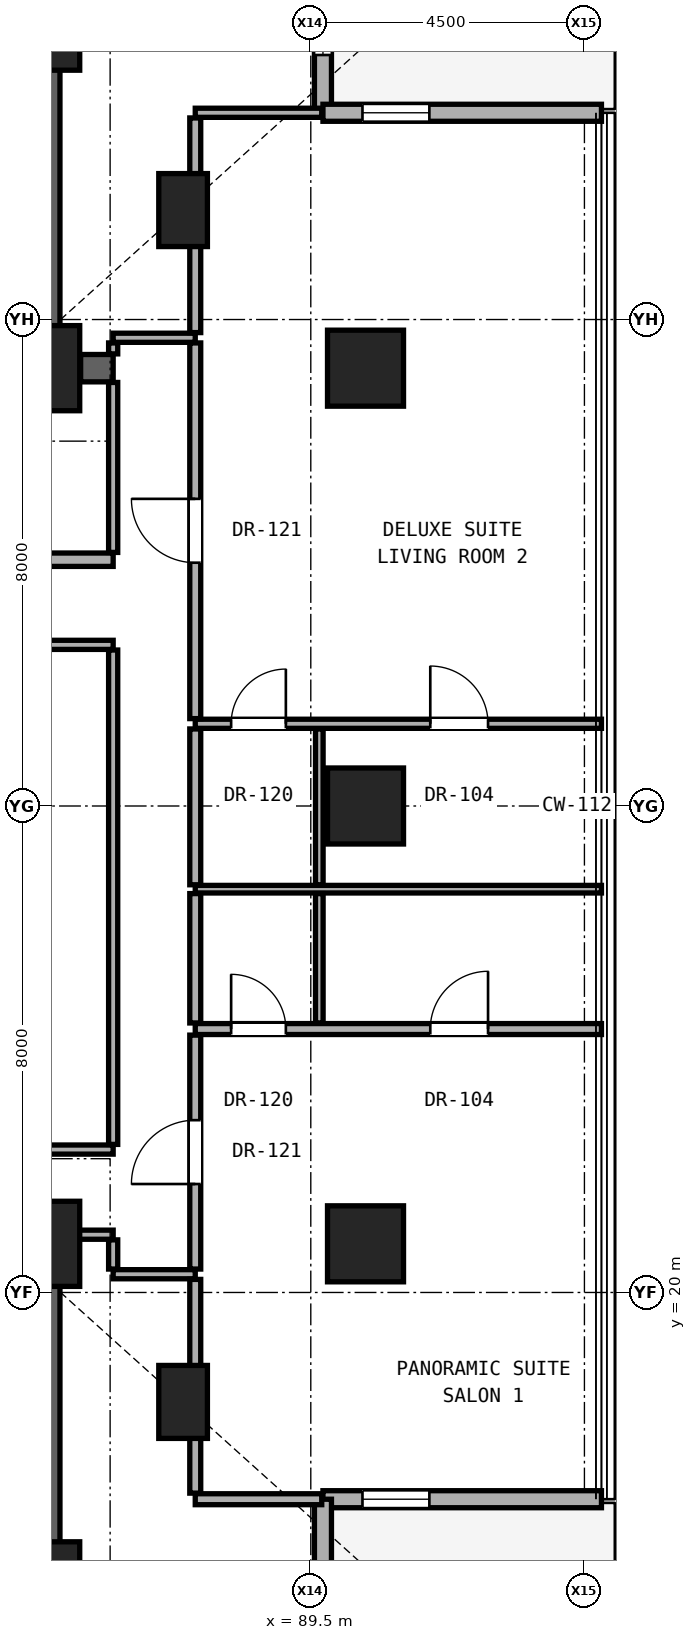
"""IFC4 building model, lengths in metres.
Left out: names, types, materials, properties, quantities, classifications, styles, units other than length and angle.
Written with IfcOpenShell. Run it as: python <this file> out.ifc"""

import sys

from ifc_helpers import new_model, si_unit, direction, frame, frame_2d, origin, origin_2d, place, context, subcontext, project, spatial, rectangle, hollow_rectangle, extrude, element, fill, save


model = new_model("IFC4")
c1 = context("Model", 3, precision=1e-05, world=origin(), true_north=direction((0.0, 1.0)))
c2 = subcontext(c1, "Body", "Model", "MODEL_VIEW")
j1 = project(units=[si_unit("LENGTHUNIT", "METRE"), si_unit("PLANEANGLEUNIT", "RADIAN")], contexts=[c1])
p1 = place(None, origin())
s1 = spatial("IfcSite", under=j1, at=p1, CompositionType="ELEMENT")
p2 = place(p1, origin())
s2 = spatial("IfcBuilding", under=s1, at=p2, CompositionType="ELEMENT")
p3 = place(p2, frame((0.0, 0.0, 22.4)))
s3 = spatial("IfcBuildingStorey", under=s2, at=p3, CompositionType="ELEMENT", Elevation=22.4)
for number, where, z_axis, x_axis in (
    (1, (85.0, 15.2, 0.0), (0.0, 0.0, 1.0), (1.0, 0.0, 0.0)),
    (2, (85.0, 20.8, 0.0), (0.0, 0.0, 1.0), (1.0, 0.0, 0.0)),
    (3, (85.0, 35.2, 0.0), (0.0, 0.0, 1.0), (1.0, 0.0, 0.0)),
    (4, (85.0, 40.8, 0.0), (0.0, 0.0, 1.0), (1.0, 0.0, 0.0)),
):
    element("IfcColumn", number, at=place(p3, frame(where, z_axis=z_axis, x_axis=x_axis)), inside=s3, PredefinedType="COLUMN", context=c2, shape_type="SweptSolid", body=[
        extrude(rectangle(XDim=1.4, YDim=1.4, at=origin_2d()), origin(), (0.0, 0.0, 1.0), 3.3),
    ])
for number, where, z_axis, x_axis in (
    (5, (90.4, 20.8, 0.0), (0.0, 0.0, 1.0), (1.0, 0.0, 0.0)),
    (6, (90.4, 28.0, 0.0), (0.0, 0.0, 1.0), (1.0, 0.0, 0.0)),
    (7, (90.4, 35.2, 0.0), (0.0, 0.0, 1.0), (1.0, 0.0, 0.0)),
):
    element("IfcColumn", number, at=place(p3, frame(where, z_axis=z_axis, x_axis=x_axis)), inside=s3, PredefinedType="COLUMN", context=c2, shape_type="SweptSolid", body=[
        extrude(hollow_rectangle(XDim=1.25, YDim=1.25, WallThickness=0.07, at=origin_2d()), origin(), (0.0, 0.0, 1.0), 3.3),
    ])
for number, where, z_axis, x_axis in (
    (8, (87.4, 18.2, 0.0), (0.0, 0.0, 1.0), (1.0, 0.0, 0.0)),
    (9, (87.4, 37.8, 0.0), (0.0, 0.0, 1.0), (1.0, 0.0, 0.0)),
):
    element("IfcColumn", number, at=place(p3, frame(where, z_axis=z_axis, x_axis=x_axis)), inside=s3, PredefinedType="PILASTER", context=c2, shape_type="SweptSolid", body=[
        extrude(rectangle(XDim=0.8, YDim=1.2, at=origin_2d()), origin(), (0.0, 0.0, 1.0), 3.3),
    ])
for number, where, z_axis, x_axis in (
    (10, (85.0, 35.2, 0.0), (0.0, 0.0, 1.0), (0.0, 1.0, 0.0)),
    (11, (85.0, 15.2, 0.0), (0.0, 0.0, 1.0), (0.0, 1.0, 0.0)),
):
    element("IfcWall", number, at=place(p3, frame(where, z_axis=z_axis, x_axis=x_axis)), inside=s3, PredefinedType="SHEAR", context=c2, shape_type="SweptSolid", body=[
        extrude(rectangle(XDim=5.6, YDim=0.75, at=frame_2d((2.8, 0.0))), origin(), (0.0, 0.0, 1.0), 3.06),
    ])
p4 = place(p3, frame((89.7, 39.4, 0.0), z_axis=(0.0, 0.0, 1.0), x_axis=(0.0, 1.0, 0.0)))
e12 = element("IfcWall", 12, at=p4, inside=s3, PredefinedType="SOLIDWALL", context=c2, shape_type="SweptSolid", body=[
    extrude(rectangle(XDim=4.58, YDim=0.28, at=frame_2d((2.29, 0.0))), origin(), (0.0, 0.0, 1.0), 3.04),
])
p5 = place(p4, frame((0.95, 0.0, 0.85)))
e13 = element("IfcOpeningElement", 13, at=p5, cuts=e12, PredefinedType="OPENING", context=c2, shape_type="SweptSolid", body=[
    extrude(rectangle(XDim=1.1, YDim=2.0, at=frame_2d((0.55, 1.0))), frame((0.0, 0.15, 0.0), z_axis=(0.0, -1.0, 0.0), x_axis=(1.0, 0.0, 0.0)), (0.0, 0.0, 1.0), 0.3),
])
p6 = place(p3, frame((89.7, 16.6, 0.0), z_axis=(0.0, 0.0, 1.0), x_axis=(1.0, 0.0, 0.0)))
e14 = element("IfcWall", 14, at=p6, inside=s3, PredefinedType="SOLIDWALL", context=c2, shape_type="SweptSolid", body=[
    extrude(rectangle(XDim=4.58, YDim=0.28, at=frame_2d((2.29, 0.0))), origin(), (0.0, 0.0, 1.0), 3.04),
])
p7 = place(p6, frame((0.65, 0.0, 0.85)))
e15 = element("IfcOpeningElement", 15, at=p7, cuts=e14, PredefinedType="OPENING", context=c2, shape_type="SweptSolid", body=[
    extrude(rectangle(XDim=1.1, YDim=2.0, at=frame_2d((0.55, 1.0))), frame((0.0, 0.15, 0.0), z_axis=(0.0, -1.0, 0.0), x_axis=(1.0, 0.0, 0.0)), (0.0, 0.0, 1.0), 0.3),
])
p8 = place(p3, frame((89.7, 12.02, 0.0), z_axis=(0.0, 0.0, 1.0), x_axis=(0.0, 1.0, 0.0)))
e16 = element("IfcWall", 16, at=p8, inside=s3, PredefinedType="SOLIDWALL", context=c2, shape_type="SweptSolid", body=[
    extrude(rectangle(XDim=4.58, YDim=0.28, at=frame_2d((2.29, 0.0))), origin(), (0.0, 0.0, 1.0), 3.04),
])
p9 = place(p3, frame((94.28, 39.4, 0.0), z_axis=(0.0, 0.0, 1.0), x_axis=(-1.0, 0.0, 0.0)))
e17 = element("IfcWall", 17, at=p9, inside=s3, PredefinedType="SOLIDWALL", context=c2, shape_type="SweptSolid", body=[
    extrude(rectangle(XDim=4.58, YDim=0.28, at=frame_2d((2.29, 0.0))), origin(), (0.0, 0.0, 1.0), 3.04),
])
p10 = place(p9, frame((2.83, 0.0, 0.85)))
e18 = element("IfcOpeningElement", 18, at=p10, cuts=e17, PredefinedType="OPENING", context=c2, shape_type="SweptSolid", body=[
    extrude(rectangle(XDim=1.1, YDim=2.0, at=frame_2d((0.55, 1.0))), frame((0.0, 0.15, 0.0), z_axis=(0.0, -1.0, 0.0), x_axis=(1.0, 0.0, 0.0)), (0.0, 0.0, 1.0), 0.3),
])
p11 = place(p3, frame((87.6, 16.6, 0.0), z_axis=(0.0, 0.0, 1.0), x_axis=(1.0, 0.0, 0.0)))
e19 = element("IfcWall", 19, at=p11, inside=s3, PredefinedType="PARTITIONING", context=c2, shape_type="SweptSolid", body=[
    extrude(rectangle(XDim=2.08, YDim=0.18, at=frame_2d((1.04, 0.0))), origin(), (0.0, 0.0, 1.0), 3.06),
])
p12 = place(p3, frame((86.25, 20.3, 0.0), z_axis=(0.0, 0.0, 1.0), x_axis=(1.0, 0.0, 0.0)))
e20 = element("IfcWall", 20, at=p12, inside=s3, PredefinedType="PARTITIONING", context=c2, shape_type="SweptSolid", body=[
    extrude(rectangle(XDim=1.35, YDim=0.15, at=frame_2d((0.675, 0.0))), origin(), (0.0, 0.0, 1.0), 3.06),
])
p13 = place(p3, frame((85.37, 20.95, 0.0), z_axis=(0.0, 0.0, 1.0), x_axis=(1.0, 0.0, 0.0)))
e21 = element("IfcWall", 21, at=p13, inside=s3, PredefinedType="PARTITIONING", context=c2, shape_type="SweptSolid", body=[
    extrude(rectangle(XDim=0.88, YDim=0.15, at=frame_2d((0.44, 0.0))), origin(), (0.0, 0.0, 1.0), 2.452),
])
p14 = place(p3, frame((66.62, 22.35, 0.0), z_axis=(0.0, 0.0, 1.0), x_axis=(1.0, 0.0, 0.0)))
e22 = element("IfcWall", 22, at=p14, inside=s3, PredefinedType="PARTITIONING", context=c2, shape_type="SweptSolid", body=[
    extrude(rectangle(XDim=19.63, YDim=0.15, at=frame_2d((9.815, 0.0))), origin(), (0.0, 0.0, 1.0), 2.125),
])
p15 = place(p14, frame((8.129, 0.0, 0.0)))
e23 = element("IfcOpeningElement", 23, at=p15, cuts=e22, PredefinedType="OPENING", context=c2, shape_type="SweptSolid", body=[
    extrude(rectangle(XDim=0.85, YDim=2.01, at=frame_2d((0.425, 1.005))), frame((0.0, 0.085, 0.0), z_axis=(0.0, -1.0, 0.0), x_axis=(1.0, 0.0, 0.0)), (0.0, 0.0, 1.0), 0.17),
])
p16 = place(p3, frame((87.6, 24.332, 0.0), z_axis=(0.0, 0.0, 1.0), x_axis=(1.0, 0.0, 0.0)))
e24 = element("IfcWall", 24, at=p16, inside=s3, PredefinedType="PARTITIONING", context=c2, shape_type="SweptSolid", body=[
    extrude(rectangle(XDim=6.68, YDim=0.18, at=frame_2d((3.34, 0.0))), origin(), (0.0, 0.0, 1.0), 2.196),
])
p17 = place(p16, frame((3.865, 0.0, 0.0)))
e25 = element("IfcOpeningElement", 25, at=p17, cuts=e24, PredefinedType="OPENING", context=c2, shape_type="SweptSolid", body=[
    extrude(rectangle(XDim=0.95, YDim=2.15, at=frame_2d((0.475, 1.075))), frame((0.0, 0.1, 0.0), z_axis=(0.0, -1.0, 0.0), x_axis=(1.0, 0.0, 0.0)), (0.0, 0.0, 1.0), 0.2),
])
p18 = place(p16, frame((0.59, 0.0, 0.0)))
e26 = element("IfcOpeningElement", 26, at=p18, cuts=e24, PredefinedType="OPENING", context=c2, shape_type="SweptSolid", body=[
    extrude(rectangle(XDim=0.9, YDim=2.1, at=frame_2d((0.45, 1.05))), frame((0.0, 0.1, 0.0), z_axis=(0.0, -1.0, 0.0), x_axis=(1.0, 0.0, 0.0)), (0.0, 0.0, 1.0), 0.2),
])
p19 = place(p3, frame((87.6, 26.632, 0.0), z_axis=(0.0, 0.0, 1.0), x_axis=(1.0, 0.0, 0.0)))
e27 = element("IfcWall", 27, at=p19, inside=s3, PredefinedType="PARTITIONING", context=c2, shape_type="SweptSolid", body=[
    extrude(rectangle(XDim=6.68, YDim=0.125, at=frame_2d((3.34, 0.0))), origin(), (0.0, 0.0, 1.0), 2.196),
])
p20 = place(p3, frame((87.6, 29.352, 0.0), z_axis=(0.0, 0.0, 1.0), x_axis=(1.0, 0.0, 0.0)))
e28 = element("IfcWall", 28, at=p20, inside=s3, PredefinedType="PARTITIONING", context=c2, shape_type="SweptSolid", body=[
    extrude(rectangle(XDim=6.68, YDim=0.15, at=frame_2d((3.34, 0.0))), origin(), (0.0, 0.0, 1.0), 2.196),
])
p21 = place(p20, frame((3.865, 0.0, 0.0)))
e29 = element("IfcOpeningElement", 29, at=p21, cuts=e28, PredefinedType="OPENING", context=c2, shape_type="SweptSolid", body=[
    extrude(rectangle(XDim=0.95, YDim=2.15, at=frame_2d((0.475, 1.075))), frame((0.0, 0.085, 0.0), z_axis=(0.0, -1.0, 0.0), x_axis=(1.0, 0.0, 0.0)), (0.0, 0.0, 1.0), 0.17),
])
p22 = place(p20, frame((0.59, 0.0, 0.0)))
e30 = element("IfcOpeningElement", 30, at=p22, cuts=e28, PredefinedType="OPENING", context=c2, shape_type="SweptSolid", body=[
    extrude(rectangle(XDim=0.9, YDim=2.1, at=frame_2d((0.45, 1.05))), frame((0.0, 0.085, 0.0), z_axis=(0.0, -1.0, 0.0), x_axis=(1.0, 0.0, 0.0)), (0.0, 0.0, 1.0), 0.17),
])
p23 = place(p3, frame((66.62, 30.65, 0.0), z_axis=(0.0, 0.0, 1.0), x_axis=(1.0, 0.0, 0.0)))
e31 = element("IfcWall", 31, at=p23, inside=s3, PredefinedType="PARTITIONING", context=c2, shape_type="SweptSolid", body=[
    extrude(rectangle(XDim=19.63, YDim=0.15, at=frame_2d((9.815, 0.0))), origin(), (0.0, 0.0, 1.0), 2.125),
])
p24 = place(p23, frame((3.855, 0.0, 0.0)))
e32 = element("IfcOpeningElement", 32, at=p24, cuts=e31, PredefinedType="OPENING", context=c2, shape_type="SweptSolid", body=[
    extrude(rectangle(XDim=0.85, YDim=2.01, at=frame_2d((0.425, 1.005))), frame((0.0, 0.085, 0.0), z_axis=(0.0, -1.0, 0.0), x_axis=(1.0, 0.0, 0.0)), (0.0, 0.0, 1.0), 0.17),
])
p25 = place(p23, frame((15.209, 0.0, 0.0)))
e33 = element("IfcOpeningElement", 33, at=p25, cuts=e31, PredefinedType="OPENING", context=c2, shape_type="SweptSolid", body=[
    extrude(rectangle(XDim=0.85, YDim=2.01, at=frame_2d((0.425, 1.005))), frame((0.0, 0.085, 0.0), z_axis=(0.0, -1.0, 0.0), x_axis=(1.0, 0.0, 0.0)), (0.0, 0.0, 1.0), 0.17),
])
p26 = place(p3, frame((71.55, 32.05, 0.0), z_axis=(0.0, 0.0, 1.0), x_axis=(1.0, 0.0, 0.0)))
e34 = element("IfcWall", 34, at=p26, inside=s3, PredefinedType="SOLIDWALL", context=c2, shape_type="SweptSolid", body=[
    extrude(rectangle(XDim=14.7, YDim=0.22, at=frame_2d((7.35, 0.0))), origin(), (0.0, 0.0, 1.0), 2.125),
])
p27 = place(p26, frame((11.39, 0.0, 0.0)))
e35 = element("IfcOpeningElement", 35, at=p27, cuts=e34, PredefinedType="OPENING", context=c2, shape_type="SweptSolid", body=[
    extrude(rectangle(XDim=0.85, YDim=2.01, at=frame_2d((0.425, 1.005))), frame((0.0, 0.12, 0.0), z_axis=(0.0, -1.0, 0.0), x_axis=(1.0, 0.0, 0.0)), (0.0, 0.0, 1.0), 0.24),
])
p28 = place(p26, frame((6.065, 0.0, 0.0)))
e36 = element("IfcOpeningElement", 36, at=p28, cuts=e34, PredefinedType="OPENING", context=c2, shape_type="SweptSolid", body=[
    extrude(rectangle(XDim=0.85, YDim=2.01, at=frame_2d((0.425, 1.005))), frame((0.0, 0.12, 0.0), z_axis=(0.0, -1.0, 0.0), x_axis=(1.0, 0.0, 0.0)), (0.0, 0.0, 1.0), 0.24),
])
p29 = place(p26, frame((1.65, 0.0, 0.0)))
e37 = element("IfcOpeningElement", 37, at=p29, cuts=e34, PredefinedType="OPENING", context=c2, shape_type="SweptSolid", body=[
    extrude(rectangle(XDim=0.85, YDim=2.01, at=frame_2d((0.425, 1.005))), frame((0.0, 0.12, 0.0), z_axis=(0.0, -1.0, 0.0), x_axis=(1.0, 0.0, 0.0)), (0.0, 0.0, 1.0), 0.24),
])
p30 = place(p3, frame((85.715, 35.2, 0.0), z_axis=(0.0, 0.0, 1.0), x_axis=(1.0, 0.0, 0.0)))
e38 = element("IfcWall", 38, at=p30, inside=s3, PredefinedType="SHEAR", context=c2, shape_type="SweptSolid", body=[
    extrude(rectangle(XDim=0.535, YDim=0.45, at=frame_2d((0.268, 0.0))), origin(), (0.0, 0.0, 1.0), 3.06),
])
p31 = place(p3, frame((86.25, 35.7, 0.0), z_axis=(0.0, 0.0, 1.0), x_axis=(1.0, 0.0, 0.0)))
e39 = element("IfcWall", 39, at=p31, inside=s3, PredefinedType="PARTITIONING", context=c2, shape_type="SweptSolid", body=[
    extrude(rectangle(XDim=1.35, YDim=0.15, at=frame_2d((0.675, 0.0))), origin(), (0.0, 0.0, 1.0), 3.06),
])
p32 = place(p3, frame((87.6, 39.4, 0.0), z_axis=(0.0, 0.0, 1.0), x_axis=(1.0, 0.0, 0.0)))
e40 = element("IfcWall", 40, at=p32, inside=s3, PredefinedType="PARTITIONING", context=c2, shape_type="SweptSolid", body=[
    extrude(rectangle(XDim=2.08, YDim=0.15, at=frame_2d((1.04, 0.0))), origin(), (0.0, 0.0, 1.0), 3.06),
])
p33 = place(p3, frame((86.25, 20.385, 0.0), z_axis=(0.0, 0.0, 1.0), x_axis=(0.0, 1.0, 0.0)))
e41 = element("IfcWall", 41, at=p33, inside=s3, PredefinedType="PARTITIONING", context=c2, shape_type="SweptSolid", body=[
    extrude(rectangle(XDim=0.48, YDim=0.15, at=frame_2d((0.24, 0.0))), origin(), (0.0, 0.0, 1.0), 2.452),
])
p34 = place(p3, frame((86.25, 22.435, 0.0), z_axis=(0.0, 0.0, 1.0), x_axis=(0.0, 1.0, 0.0)))
e42 = element("IfcWall", 42, at=p34, inside=s3, PredefinedType="PARTITIONING", context=c2, shape_type="SweptSolid", body=[
    extrude(rectangle(XDim=8.13, YDim=0.15, at=frame_2d((4.065, 0.0))), origin(), (0.0, 0.0, 1.0), 2.279),
])
p35 = place(p3, frame((86.25, 32.17, 0.0), z_axis=(0.0, 0.0, 1.0), x_axis=(0.0, 1.0, 0.0)))
e43 = element("IfcWall", 43, at=p35, inside=s3, PredefinedType="PARTITIONING", context=c2, shape_type="SweptSolid", body=[
    extrude(rectangle(XDim=2.795, YDim=0.15, at=frame_2d((1.397, 0.0))), origin(), (0.0, 0.0, 1.0), 2.452),
])
p36 = place(p3, frame((86.25, 35.435, 0.0), z_axis=(0.0, 0.0, 1.0), x_axis=(0.0, 1.0, 0.0)))
e44 = element("IfcWall", 44, at=p36, inside=s3, PredefinedType="PARTITIONING", context=c2, shape_type="SweptSolid", body=[
    extrude(rectangle(XDim=0.18, YDim=0.15, at=frame_2d((0.09, 0.0))), origin(), (0.0, 0.0, 1.0), 2.452),
])
p37 = place(p3, frame((87.6, 16.7, 0.0), z_axis=(0.0, 0.0, 1.0), x_axis=(0.0, 1.0, 0.0)))
e45 = element("IfcWall", 45, at=p37, inside=s3, PredefinedType="PARTITIONING", context=c2, shape_type="SweptSolid", body=[
    extrude(rectangle(XDim=3.515, YDim=0.18, at=frame_2d((1.758, 0.0))), origin(), (0.0, 0.0, 1.0), 2.436),
])
p38 = place(p3, frame((87.6, 20.385, 0.0), z_axis=(0.0, 0.0, 1.0), x_axis=(0.0, 1.0, 0.0)))
e46 = element("IfcWall", 46, at=p38, inside=s3, PredefinedType="PARTITIONING", context=c2, shape_type="SweptSolid", body=[
    extrude(rectangle(XDim=3.847, YDim=0.18, at=frame_2d((1.923, 0.0))), origin(), (0.0, 0.0, 1.0), 2.452),
])
p39 = place(p38, frame((1.398, 0.0, 0.0)))
e47 = element("IfcOpeningElement", 47, at=p39, cuts=e46, PredefinedType="OPENING", context=c2, shape_type="SweptSolid", body=[
    extrude(rectangle(XDim=1.05, YDim=2.2, at=frame_2d((0.525, 1.1))), frame((0.0, 0.1, 0.0), z_axis=(0.0, -1.0, 0.0), x_axis=(1.0, 0.0, 0.0)), (0.0, 0.0, 1.0), 0.2),
])
p40 = place(p3, frame((87.6, 24.432, 0.0), z_axis=(0.0, 0.0, 1.0), x_axis=(0.0, 1.0, 0.0)))
e48 = element("IfcWall", 48, at=p40, inside=s3, PredefinedType="PARTITIONING", context=c2, shape_type="SweptSolid", body=[
    extrude(rectangle(XDim=2.128, YDim=0.18, at=frame_2d((1.064, 0.0))), origin(), (0.0, 0.0, 1.0), 3.06),
])
p41 = place(p3, frame((87.6, 26.705, 0.0), z_axis=(0.0, 0.0, 1.0), x_axis=(0.0, 1.0, 0.0)))
e49 = element("IfcWall", 49, at=p41, inside=s3, PredefinedType="PARTITIONING", context=c2, shape_type="SweptSolid", body=[
    extrude(rectangle(XDim=2.562, YDim=0.18, at=frame_2d((1.281, 0.0))), origin(), (0.0, 0.0, 1.0), 2.279),
])
p42 = place(p3, frame((87.6, 29.437, 0.0), z_axis=(0.0, 0.0, 1.0), x_axis=(0.0, 1.0, 0.0)))
e50 = element("IfcWall", 50, at=p42, inside=s3, PredefinedType="PARTITIONING", context=c2, shape_type="SweptSolid", body=[
    extrude(rectangle(XDim=6.178, YDim=0.18, at=frame_2d((3.089, 0.0))), origin(), (0.0, 0.0, 1.0), 2.452),
])
p43 = place(p42, frame((2.564, 0.0, 0.0)))
e51 = element("IfcOpeningElement", 51, at=p43, cuts=e50, PredefinedType="OPENING", context=c2, shape_type="SweptSolid", body=[
    extrude(rectangle(XDim=1.05, YDim=2.2, at=frame_2d((0.525, 1.1))), frame((0.0, 0.1, 0.0), z_axis=(0.0, -1.0, 0.0), x_axis=(1.0, 0.0, 0.0)), (0.0, 0.0, 1.0), 0.2),
])
p44 = place(p3, frame((87.6, 35.785, 0.0), z_axis=(0.0, 0.0, 1.0), x_axis=(0.0, 1.0, 0.0)))
e52 = element("IfcWall", 52, at=p44, inside=s3, PredefinedType="PARTITIONING", context=c2, shape_type="SweptSolid", body=[
    extrude(rectangle(XDim=3.53, YDim=0.18, at=frame_2d((1.765, 0.0))), origin(), (0.0, 0.0, 1.0), 2.436),
])
p45 = place(p3, frame((89.64, 24.432, 0.0), z_axis=(0.0, 0.0, 1.0), x_axis=(0.0, 1.0, 0.0)))
e53 = element("IfcWall", 53, at=p45, inside=s3, PredefinedType="PARTITIONING", context=c2, shape_type="SweptSolid", body=[
    extrude(rectangle(XDim=2.128, YDim=0.125, at=frame_2d((1.064, 0.0))), origin(), (0.0, 0.0, 1.0), 3.06),
])
p46 = place(p3, frame((89.64, 26.705, 0.0), z_axis=(0.0, 0.0, 1.0), x_axis=(0.0, 1.0, 0.0)))
e54 = element("IfcWall", 54, at=p46, inside=s3, PredefinedType="PARTITIONING", context=c2, shape_type="SweptSolid", body=[
    extrude(rectangle(XDim=2.562, YDim=0.125, at=frame_2d((1.281, 0.0))), origin(), (0.0, 0.0, 1.0), 2.279),
])
p47 = place(p5, origin())
e55 = element("IfcWindow", 55, at=p47, inside=s3, PartitioningType="SINGLE_PANEL", PredefinedType="WINDOW", context=c2, shape_type="SweptSolid", body=[
    extrude(rectangle(XDim=1.1, YDim=2.0, at=frame_2d((0.55, 1.0))), frame((0.0, 0.03, 0.0), z_axis=(0.0, -1.0, 0.0), x_axis=(1.0, 0.0, 0.0)), (0.0, 0.0, 1.0), 0.06),
])
fill(e13, e55)
p48 = place(p7, origin())
e56 = element("IfcWindow", 56, at=p48, inside=s3, PartitioningType="SINGLE_PANEL", PredefinedType="WINDOW", context=c2, shape_type="SweptSolid", body=[
    extrude(rectangle(XDim=1.1, YDim=2.0, at=frame_2d((0.55, 1.0))), frame((0.0, 0.03, 0.0), z_axis=(0.0, -1.0, 0.0), x_axis=(1.0, 0.0, 0.0)), (0.0, 0.0, 1.0), 0.06),
])
fill(e15, e56)
p49 = place(p10, origin())
e57 = element("IfcWindow", 57, at=p49, inside=s3, PartitioningType="SINGLE_PANEL", PredefinedType="WINDOW", context=c2, shape_type="SweptSolid", body=[
    extrude(rectangle(XDim=1.1, YDim=2.0, at=frame_2d((0.55, 1.0))), frame((0.0, 0.03, 0.0), z_axis=(0.0, -1.0, 0.0), x_axis=(1.0, 0.0, 0.0)), (0.0, 0.0, 1.0), 0.06),
])
fill(e18, e57)
p50 = place(p39, origin())
e58 = element("IfcDoor", 58, at=p50, inside=s3, OperationType="SINGLE_SWING_LEFT", PredefinedType="DOOR", context=c2, shape_type="SweptSolid", body=[
    extrude(rectangle(XDim=1.05, YDim=2.2, at=frame_2d((0.525, 1.1))), frame((0.0, 0.025, 0.0), z_axis=(0.0, -1.0, 0.0), x_axis=(1.0, 0.0, 0.0)), (0.0, 0.0, 1.0), 0.05),
])
fill(e47, e58)
p51 = place(p17, origin())
e59 = element("IfcDoor", 59, at=p51, inside=s3, OperationType="SINGLE_SWING_RIGHT", PredefinedType="DOOR", context=c2, shape_type="SweptSolid", body=[
    extrude(rectangle(XDim=0.95, YDim=2.15, at=frame_2d((0.475, 1.075))), frame((0.0, 0.025, 0.0), z_axis=(0.0, -1.0, 0.0), x_axis=(1.0, 0.0, 0.0)), (0.0, 0.0, 1.0), 0.05),
])
fill(e25, e59)
p52 = place(p18, origin())
e60 = element("IfcDoor", 60, at=p52, inside=s3, OperationType="SINGLE_SWING_LEFT", PredefinedType="DOOR", context=c2, shape_type="SweptSolid", body=[
    extrude(rectangle(XDim=0.9, YDim=2.1, at=frame_2d((0.45, 1.05))), frame((0.0, 0.025, 0.0), z_axis=(0.0, -1.0, 0.0), x_axis=(1.0, 0.0, 0.0)), (0.0, 0.0, 1.0), 0.05),
])
fill(e26, e60)
p53 = place(p43, origin())
e61 = element("IfcDoor", 61, at=p53, inside=s3, OperationType="SINGLE_SWING_RIGHT", PredefinedType="DOOR", context=c2, shape_type="SweptSolid", body=[
    extrude(rectangle(XDim=1.05, YDim=2.2, at=frame_2d((0.525, 1.1))), frame((0.0, 0.025, 0.0), z_axis=(0.0, -1.0, 0.0), x_axis=(1.0, 0.0, 0.0)), (0.0, 0.0, 1.0), 0.05),
])
fill(e51, e61)
p54 = place(p21, origin())
e62 = element("IfcDoor", 62, at=p54, inside=s3, OperationType="SINGLE_SWING_LEFT", PredefinedType="DOOR", context=c2, shape_type="SweptSolid", body=[
    extrude(rectangle(XDim=0.95, YDim=2.15, at=frame_2d((0.475, 1.075))), frame((0.0, 0.025, 0.0), z_axis=(0.0, -1.0, 0.0), x_axis=(1.0, 0.0, 0.0)), (0.0, 0.0, 1.0), 0.05),
])
fill(e29, e62)
p55 = place(p22, origin())
e63 = element("IfcDoor", 63, at=p55, inside=s3, OperationType="SINGLE_SWING_RIGHT", PredefinedType="DOOR", context=c2, shape_type="SweptSolid", body=[
    extrude(rectangle(XDim=0.9, YDim=2.1, at=frame_2d((0.45, 1.05))), frame((0.0, 0.025, 0.0), z_axis=(0.0, -1.0, 0.0), x_axis=(1.0, 0.0, 0.0)), (0.0, 0.0, 1.0), 0.05),
])
fill(e30, e63)
save(model, sys.argv[1])
